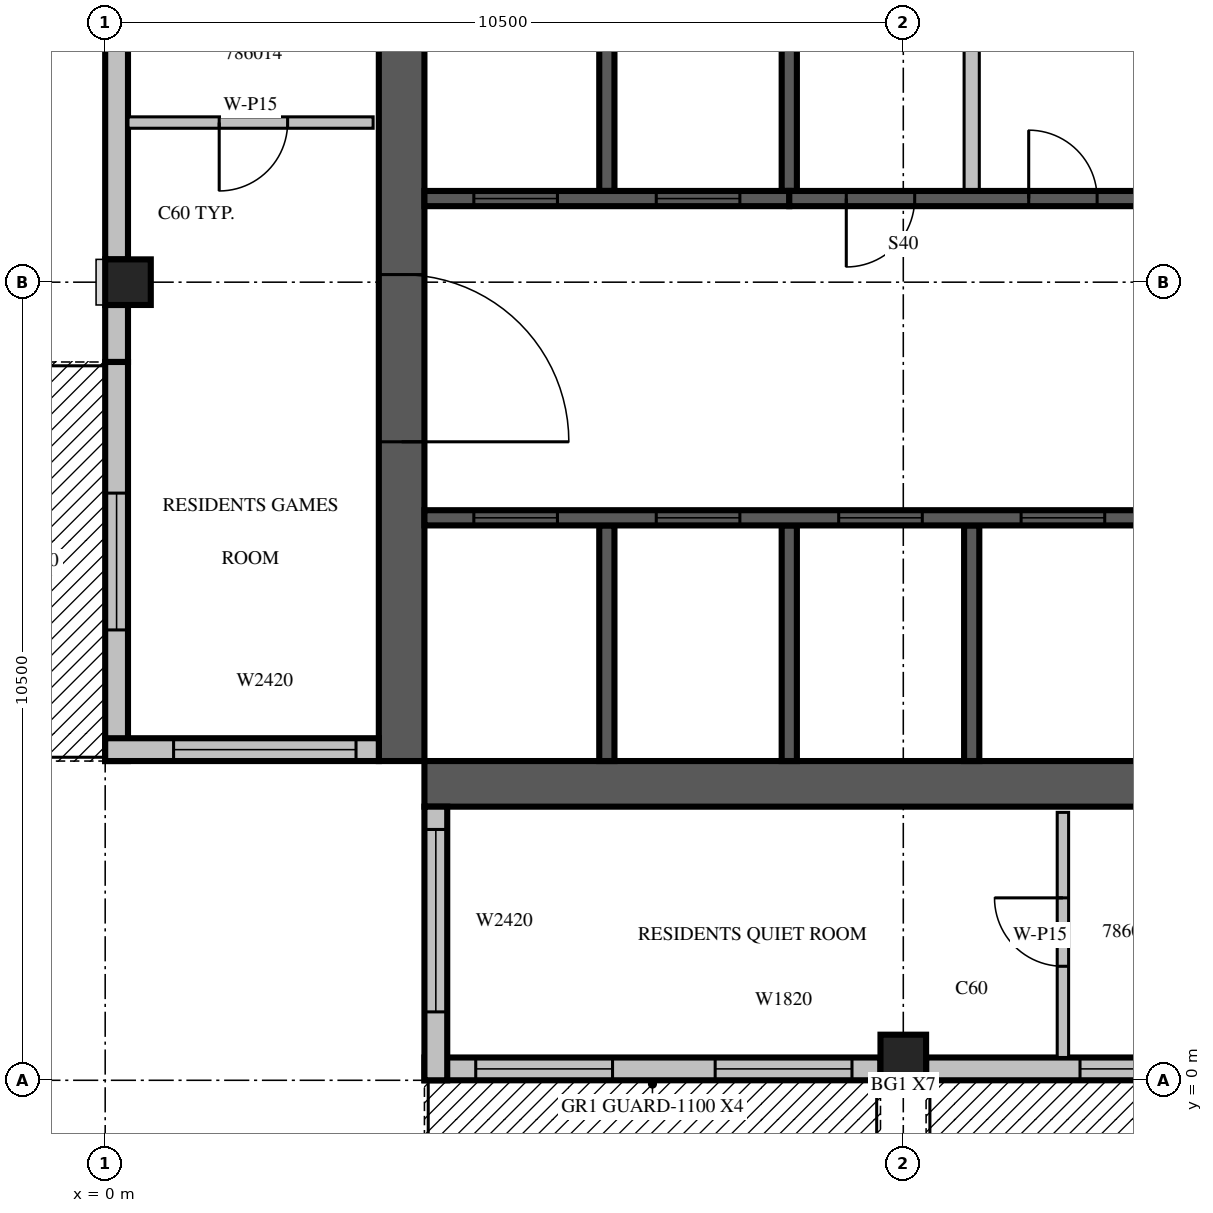
"""IFC4 building model, lengths in metres.
Left out: names, types, materials, properties, quantities, classifications, styles, units other than length and angle.
Written with IfcOpenShell. Run it as: python <this file> out.ifc"""

import sys

from ifc_helpers import new_model, si_unit, direction, frame, frame_2d, origin, origin_2d, place, context, subcontext, project, spatial, rectangle, extrude, source, transform, mapped, element, fill, save


model = new_model("IFC4")
c1 = context("Model", 3, precision=1e-05, world=origin(), true_north=direction((0.0, 1.0)))
c2 = subcontext(c1, "Body", "Model", "MODEL_VIEW")
j1 = project(units=[si_unit("LENGTHUNIT", "METRE"), si_unit("PLANEANGLEUNIT", "RADIAN")], contexts=[c1])
p1 = place(None, origin())
s1 = spatial("IfcSite", under=j1, at=p1, CompositionType="ELEMENT")
p2 = place(p1, origin())
s2 = spatial("IfcBuilding", under=s1, at=p2, CompositionType="ELEMENT")
p3 = place(p2, frame((0.0, 0.0, 361.5)))
s3 = spatial("IfcBuildingStorey", under=s2, at=p3, CompositionType="ELEMENT", Elevation=361.5)
m1 = source(origin(), c2, "Body", "SweptSolid", [
    extrude(rectangle(XDim=0.6, YDim=0.6, at=origin_2d()), origin(), (0.0, 0.0, 1.0), 3.5),
])
for number, where, z_axis, x_axis in (
    (1, (10.5, 0.3, 0.0), (0.0, 0.0, 1.0), (1.0, 0.0, 0.0)),
    (2, (0.3, 10.5, 0.0), (0.0, 0.0, 1.0), (1.0, 0.0, 0.0)),
):
    element("IfcColumn", number, at=place(p3, frame(where, z_axis=z_axis, x_axis=x_axis)), inside=s3, PredefinedType="COLUMN", context=c2, shape_type="MappedRepresentation", body=[
        mapped(m1, transform((0.0, 0.0, 0.0), scale=1.0)),
    ])
m2 = source(origin(), c2, "Body", "SweptSolid", [
    extrude(rectangle(XDim=17.4, YDim=0.6, at=frame_2d((8.7, 0.0))), origin(), (0.0, 0.0, 1.0), 3.5),
])
p4 = place(p3, frame((3.9, 4.2, 0.0), z_axis=(0.0, 0.0, 1.0), x_axis=(0.0, 1.0, 0.0)))
e3 = element("IfcWall", 3, at=p4, inside=s3, PredefinedType="SHEAR", context=c2, shape_type="MappedRepresentation", body=[
    mapped(m2, transform((0.0, 0.0, 0.0), scale=1.0)),
])
m3 = source(origin(), c2, "Body", "SweptSolid", [
    extrude(rectangle(XDim=2.2, YDim=2.1, at=frame_2d((1.1, 1.05))), frame((0.0, 0.31, 0.0), z_axis=(0.0, -1.0, 0.0), x_axis=(1.0, 0.0, 0.0)), (0.0, 0.0, 1.0), 0.62),
])
p5 = place(p4, frame((4.2, 0.0, 0.0)))
e4 = element("IfcOpeningElement", 4, at=p5, cuts=e3, PredefinedType="OPENING", context=c2, shape_type="MappedRepresentation", body=[
    mapped(m3, transform((0.0, 0.0, 0.0), scale=1.0)),
])
p6 = place(p3, frame((4.2, 3.9, 0.0), z_axis=(0.0, 0.0, 1.0), x_axis=(1.0, 0.0, 0.0)))
e5 = element("IfcWall", 5, at=p6, inside=s3, PredefinedType="SHEAR", context=c2, shape_type="MappedRepresentation", body=[
    mapped(m2, transform((0.0, 0.0, 0.0), scale=1.0)),
])
m4 = source(origin(), c2, "Body", "SweptSolid", [
    extrude(rectangle(XDim=0.9, YDim=2.1, at=frame_2d((0.45, 1.05))), frame((0.0, 0.31, 0.0), z_axis=(0.0, -1.0, 0.0), x_axis=(1.0, 0.0, 0.0)), (0.0, 0.0, 1.0), 0.62),
])
p7 = place(p6, frame((14.0, 0.0, 0.0)))
e6 = element("IfcOpeningElement", 6, at=p7, cuts=e5, PredefinedType="OPENING", context=c2, shape_type="MappedRepresentation", body=[
    mapped(m4, transform((0.0, 0.0, 0.0), scale=1.0)),
])
m5 = source(origin(), c2, "Body", "SweptSolid", [
    extrude(rectangle(XDim=6.0, YDim=0.3, at=frame_2d((3.0, 0.0))), origin(), (0.0, 0.0, 1.0), 3.1),
])
p8 = place(p3, frame((4.2, 0.15, 0.0), z_axis=(0.0, 0.0, 1.0), x_axis=(1.0, 0.0, 0.0)))
e7 = element("IfcWall", 7, at=p8, inside=s3, PredefinedType="STANDARD", context=c2, shape_type="MappedRepresentation", body=[
    mapped(m5, transform((0.0, 0.0, 0.0), scale=1.0)),
])
m6 = source(origin(), c2, "Body", "SweptSolid", [
    extrude(rectangle(XDim=1.8, YDim=2.4, at=frame_2d((0.9, 1.2))), frame((0.0, 0.16, 0.0), z_axis=(0.0, -1.0, 0.0), x_axis=(1.0, 0.0, 0.0)), (0.0, 0.0, 1.0), 0.32),
])
p9 = place(p8, frame((0.675, 0.0, 0.0)))
e8 = element("IfcOpeningElement", 8, at=p9, cuts=e7, PredefinedType="OPENING", context=c2, shape_type="MappedRepresentation", body=[
    mapped(m6, transform((0.0, 0.0, 0.0), scale=1.0)),
])
m7 = source(origin(), c2, "Body", "SweptSolid", [
    extrude(rectangle(XDim=1.8, YDim=2.0, at=frame_2d((0.9, 1.0))), frame((0.0, 0.16, 0.0), z_axis=(0.0, -1.0, 0.0), x_axis=(1.0, 0.0, 0.0)), (0.0, 0.0, 1.0), 0.32),
])
p10 = place(p8, frame((3.825, 0.0, 0.6)))
e9 = element("IfcOpeningElement", 9, at=p10, cuts=e7, PredefinedType="OPENING", context=c2, shape_type="MappedRepresentation", body=[
    mapped(m7, transform((0.0, 0.0, 0.0), scale=1.0)),
])
m8 = source(origin(), c2, "Body", "SweptSolid", [
    extrude(rectangle(XDim=9.9, YDim=0.3, at=frame_2d((4.95, 0.0))), origin(), (0.0, 0.0, 1.0), 3.1),
])
p11 = place(p3, frame((10.8, 0.15, 0.0), z_axis=(0.0, 0.0, 1.0), x_axis=(1.0, 0.0, 0.0)))
e10 = element("IfcWall", 10, at=p11, inside=s3, PredefinedType="STANDARD", context=c2, shape_type="MappedRepresentation", body=[
    mapped(m8, transform((0.0, 0.0, 0.0), scale=1.0)),
])
p12 = place(p11, frame((2.025, 0.0, 0.0)))
e11 = element("IfcOpeningElement", 11, at=p12, cuts=e10, PredefinedType="OPENING", context=c2, shape_type="MappedRepresentation", body=[
    mapped(m6, transform((0.0, 0.0, 0.0), scale=1.0)),
])
m9 = source(origin(), c2, "Body", "SweptSolid", [
    extrude(rectangle(XDim=3.6, YDim=2.0, at=frame_2d((1.8, 1.0))), frame((0.0, 0.16, 0.0), z_axis=(0.0, -1.0, 0.0), x_axis=(1.0, 0.0, 0.0)), (0.0, 0.0, 1.0), 0.32),
])
p13 = place(p11, frame((5.775, 0.0, 0.6)))
e12 = element("IfcOpeningElement", 12, at=p13, cuts=e10, PredefinedType="OPENING", context=c2, shape_type="MappedRepresentation", body=[
    mapped(m9, transform((0.0, 0.0, 0.0), scale=1.0)),
])
m10 = source(origin(), c2, "Body", "SweptSolid", [
    extrude(rectangle(XDim=3.9, YDim=0.3, at=frame_2d((1.95, 0.0))), origin(), (0.0, 0.0, 1.0), 3.1),
])
p14 = place(p3, frame((0.15, 14.7, 0.0), z_axis=(0.0, 0.0, 1.0), x_axis=(0.0, -1.0, 0.0)))
e13 = element("IfcWall", 13, at=p14, inside=s3, PredefinedType="STANDARD", context=c2, shape_type="MappedRepresentation", body=[
    mapped(m10, transform((0.0, 0.0, 0.0), scale=1.0)),
])
m11 = source(origin(), c2, "Body", "SweptSolid", [
    extrude(rectangle(XDim=0.75, YDim=0.3, at=frame_2d((0.375, 0.0))), origin(), (0.0, 0.0, 1.0), 3.1),
])
p15 = place(p3, frame((0.15, 10.2, 0.0), z_axis=(0.0, 0.0, 1.0), x_axis=(0.0, -1.0, 0.0)))
e14 = element("IfcWall", 14, at=p15, inside=s3, PredefinedType="STANDARD", context=c2, shape_type="MappedRepresentation", body=[
    mapped(m11, transform((0.0, 0.0, 0.0), scale=1.0)),
])
m12 = source(origin(), c2, "Body", "SweptSolid", [
    extrude(rectangle(XDim=5.25, YDim=0.3, at=frame_2d((2.625, 0.0))), origin(), (0.0, 0.0, 1.0), 3.1),
])
p16 = place(p3, frame((0.15, 9.45, 0.0), z_axis=(0.0, 0.0, 1.0), x_axis=(0.0, -1.0, 0.0)))
e15 = element("IfcWall", 15, at=p16, inside=s3, PredefinedType="STANDARD", context=c2, shape_type="MappedRepresentation", body=[
    mapped(m12, transform((0.0, 0.0, 0.0), scale=1.0)),
])
p17 = place(p16, frame((1.725, 0.0, 0.0)))
e16 = element("IfcOpeningElement", 16, at=p17, cuts=e15, PredefinedType="OPENING", context=c2, shape_type="MappedRepresentation", body=[
    mapped(m6, transform((0.0, 0.0, 0.0), scale=1.0)),
])
m13 = source(origin(), c2, "Body", "SweptSolid", [
    extrude(rectangle(XDim=3.6, YDim=0.3, at=frame_2d((1.8, 0.0))), origin(), (0.0, 0.0, 1.0), 3.1),
])
p18 = place(p3, frame((0.0, 4.35, 0.0), z_axis=(0.0, 0.0, 1.0), x_axis=(1.0, 0.0, 0.0)))
e17 = element("IfcWall", 17, at=p18, inside=s3, PredefinedType="STANDARD", context=c2, shape_type="MappedRepresentation", body=[
    mapped(m13, transform((0.0, 0.0, 0.0), scale=1.0)),
])
m14 = source(origin(), c2, "Body", "SweptSolid", [
    extrude(rectangle(XDim=2.4, YDim=2.0, at=frame_2d((1.2, 1.0))), frame((0.0, 0.16, 0.0), z_axis=(0.0, -1.0, 0.0), x_axis=(1.0, 0.0, 0.0)), (0.0, 0.0, 1.0), 0.32),
])
p19 = place(p18, frame((0.9, 0.0, 0.6)))
e18 = element("IfcOpeningElement", 18, at=p19, cuts=e17, PredefinedType="OPENING", context=c2, shape_type="MappedRepresentation", body=[
    mapped(m14, transform((0.0, 0.0, 0.0), scale=1.0)),
])
p20 = place(p3, frame((4.35, 3.6, 0.0), z_axis=(0.0, 0.0, 1.0), x_axis=(0.0, -1.0, 0.0)))
e19 = element("IfcWall", 19, at=p20, inside=s3, PredefinedType="STANDARD", context=c2, shape_type="MappedRepresentation", body=[
    mapped(m13, transform((0.0, 0.0, 0.0), scale=1.0)),
])
p21 = place(p20, frame((0.3, 0.0, 0.6)))
e20 = element("IfcOpeningElement", 20, at=p21, cuts=e19, PredefinedType="OPENING", context=c2, shape_type="MappedRepresentation", body=[
    mapped(m14, transform((0.0, 0.0, 0.0), scale=1.0)),
])
m15 = source(origin(), c2, "Body", "SweptSolid", [
    extrude(rectangle(XDim=3.1, YDim=0.2, at=frame_2d((1.55, 0.0))), origin(), (0.0, 0.0, 1.0), 3.5),
])
for number, where, z_axis, x_axis in (
    (21, (6.6, 4.2, 0.0), (0.0, 0.0, 1.0), (0.0, 1.0, 0.0)),
    (22, (9.0, 4.2, 0.0), (0.0, 0.0, 1.0), (0.0, 1.0, 0.0)),
    (23, (11.4, 4.2, 0.0), (0.0, 0.0, 1.0), (0.0, 1.0, 0.0)),
):
    element("IfcWall", number, at=place(p3, frame(where, z_axis=z_axis, x_axis=x_axis)), inside=s3, PredefinedType="SOLIDWALL", context=c2, shape_type="MappedRepresentation", body=[
        mapped(m15, transform((0.0, 0.0, 0.0), scale=1.0)),
    ])
m16 = source(origin(), c2, "Body", "SweptSolid", [
    extrude(rectangle(XDim=3.0, YDim=0.2, at=frame_2d((1.5, 0.0))), origin(), (0.0, 0.0, 1.0), 3.5),
])
p22 = place(p3, frame((6.6, 11.7, 0.0), z_axis=(0.0, 0.0, 1.0), x_axis=(0.0, 1.0, 0.0)))
e24 = element("IfcWall", 24, at=p22, inside=s3, PredefinedType="SOLIDWALL", context=c2, shape_type="MappedRepresentation", body=[
    mapped(m16, transform((0.0, 0.0, 0.0), scale=1.0)),
])
m17 = source(origin(), c2, "Body", "SweptSolid", [
    extrude(rectangle(XDim=3.0, YDim=0.2, at=frame_2d((1.5, 0.0))), origin(), (0.0, 0.0, 1.0), 3.1),
])
p23 = place(p3, frame((9.0, 11.7, 0.0), z_axis=(0.0, 0.0, 1.0), x_axis=(0.0, 1.0, 0.0)))
e25 = element("IfcWall", 25, at=p23, inside=s3, PredefinedType="SOLIDWALL", context=c2, shape_type="MappedRepresentation", body=[
    mapped(m17, transform((0.0, 0.0, 0.0), scale=1.0)),
])
m18 = source(origin(), c2, "Body", "SweptSolid", [
    extrude(rectangle(XDim=3.0, YDim=0.2, at=frame_2d((1.5, 0.0))), origin(), (0.0, 0.0, 1.0), 3.1),
])
p24 = place(p3, frame((11.4, 11.7, 0.0), z_axis=(0.0, 0.0, 1.0), x_axis=(0.0, 1.0, 0.0)))
e26 = element("IfcWall", 26, at=p24, inside=s3, PredefinedType="PARTITIONING", context=c2, shape_type="MappedRepresentation", body=[
    mapped(m18, transform((0.0, 0.0, 0.0), scale=1.0)),
])
m19 = source(origin(), c2, "Body", "SweptSolid", [
    extrude(rectangle(XDim=9.6, YDim=0.2, at=frame_2d((4.8, 0.0))), origin(), (0.0, 0.0, 1.0), 3.5),
])
p25 = place(p3, frame((4.2, 7.4, 0.0), z_axis=(0.0, 0.0, 1.0), x_axis=(1.0, 0.0, 0.0)))
e27 = element("IfcWall", 27, at=p25, inside=s3, PredefinedType="SOLIDWALL", context=c2, shape_type="MappedRepresentation", body=[
    mapped(m19, transform((0.0, 0.0, 0.0), scale=1.0)),
])
m20 = source(origin(), c2, "Body", "SweptSolid", [
    extrude(rectangle(XDim=1.1, YDim=2.1, at=frame_2d((0.55, 1.05))), frame((0.0, 0.11, 0.0), z_axis=(0.0, -1.0, 0.0), x_axis=(1.0, 0.0, 0.0)), (0.0, 0.0, 1.0), 0.22),
])
p26 = place(p25, frame((0.65, 0.0, 0.0)))
e28 = element("IfcOpeningElement", 28, at=p26, cuts=e27, PredefinedType="OPENING", context=c2, shape_type="MappedRepresentation", body=[
    mapped(m20, transform((0.0, 0.0, 0.0), scale=1.0)),
])
p27 = place(p25, frame((3.05, 0.0, 0.0)))
e29 = element("IfcOpeningElement", 29, at=p27, cuts=e27, PredefinedType="OPENING", context=c2, shape_type="MappedRepresentation", body=[
    mapped(m20, transform((0.0, 0.0, 0.0), scale=1.0)),
])
p28 = place(p25, frame((5.45, 0.0, 0.0)))
e30 = element("IfcOpeningElement", 30, at=p28, cuts=e27, PredefinedType="OPENING", context=c2, shape_type="MappedRepresentation", body=[
    mapped(m20, transform((0.0, 0.0, 0.0), scale=1.0)),
])
p29 = place(p25, frame((7.85, 0.0, 0.0)))
e31 = element("IfcOpeningElement", 31, at=p29, cuts=e27, PredefinedType="OPENING", context=c2, shape_type="MappedRepresentation", body=[
    mapped(m20, transform((0.0, 0.0, 0.0), scale=1.0)),
])
m21 = source(origin(), c2, "Body", "SweptSolid", [
    extrude(rectangle(XDim=4.8, YDim=0.2, at=frame_2d((2.4, 0.0))), origin(), (0.0, 0.0, 1.0), 3.5),
])
p30 = place(p3, frame((4.2, 11.6, 0.0), z_axis=(0.0, 0.0, 1.0), x_axis=(1.0, 0.0, 0.0)))
e32 = element("IfcWall", 32, at=p30, inside=s3, PredefinedType="SOLIDWALL", context=c2, shape_type="MappedRepresentation", body=[
    mapped(m21, transform((0.0, 0.0, 0.0), scale=1.0)),
])
p31 = place(p30, frame((0.65, 0.0, 0.0)))
e33 = element("IfcOpeningElement", 33, at=p31, cuts=e32, PredefinedType="OPENING", context=c2, shape_type="MappedRepresentation", body=[
    mapped(m20, transform((0.0, 0.0, 0.0), scale=1.0)),
])
p32 = place(p30, frame((3.05, 0.0, 0.0)))
e34 = element("IfcOpeningElement", 34, at=p32, cuts=e32, PredefinedType="OPENING", context=c2, shape_type="MappedRepresentation", body=[
    mapped(m20, transform((0.0, 0.0, 0.0), scale=1.0)),
])
m22 = source(origin(), c2, "Body", "SweptSolid", [
    extrude(rectangle(XDim=4.8, YDim=0.2, at=frame_2d((2.4, 0.0))), origin(), (0.0, 0.0, 1.0), 3.1),
])
p33 = place(p3, frame((9.0, 11.6, 0.0), z_axis=(0.0, 0.0, 1.0), x_axis=(1.0, 0.0, 0.0)))
e35 = element("IfcWall", 35, at=p33, inside=s3, PredefinedType="SOLIDWALL", context=c2, shape_type="MappedRepresentation", body=[
    mapped(m22, transform((0.0, 0.0, 0.0), scale=1.0)),
])
m23 = source(origin(), c2, "Body", "SweptSolid", [
    extrude(rectangle(XDim=0.9, YDim=2.1, at=frame_2d((0.45, 1.05))), frame((0.0, 0.11, 0.0), z_axis=(0.0, -1.0, 0.0), x_axis=(1.0, 0.0, 0.0)), (0.0, 0.0, 1.0), 0.22),
])
p34 = place(p33, frame((0.75, 0.0, 0.0)))
e36 = element("IfcOpeningElement", 36, at=p34, cuts=e35, PredefinedType="OPENING", context=c2, shape_type="MappedRepresentation", body=[
    mapped(m23, transform((0.0, 0.0, 0.0), scale=1.0)),
])
p35 = place(p33, frame((3.15, 0.0, 0.0)))
e37 = element("IfcOpeningElement", 37, at=p35, cuts=e35, PredefinedType="OPENING", context=c2, shape_type="MappedRepresentation", body=[
    mapped(m23, transform((0.0, 0.0, 0.0), scale=1.0)),
])
m24 = source(origin(), c2, "Body", "SweptSolid", [
    extrude(rectangle(XDim=3.225, YDim=0.15, at=frame_2d((1.613, 0.0))), origin(), (0.0, 0.0, 1.0), 3.1),
])
p36 = place(p3, frame((12.6, 3.525, 0.0), z_axis=(0.0, 0.0, 1.0), x_axis=(0.0, -1.0, 0.0)))
e38 = element("IfcWall", 38, at=p36, inside=s3, PredefinedType="PARTITIONING", context=c2, shape_type="MappedRepresentation", body=[
    mapped(m24, transform((0.0, 0.0, 0.0), scale=1.0)),
])
m25 = source(origin(), c2, "Body", "SweptSolid", [
    extrude(rectangle(XDim=0.9, YDim=2.1, at=frame_2d((0.45, 1.05))), frame((0.0, 0.085, 0.0), z_axis=(0.0, -1.0, 0.0), x_axis=(1.0, 0.0, 0.0)), (0.0, 0.0, 1.0), 0.17),
])
p37 = place(p36, frame((1.125, 0.0, 0.0)))
e39 = element("IfcOpeningElement", 39, at=p37, cuts=e38, PredefinedType="OPENING", context=c2, shape_type="MappedRepresentation", body=[
    mapped(m25, transform((0.0, 0.0, 0.0), scale=1.0)),
])
p38 = place(p3, frame((0.3, 12.6, 0.0), z_axis=(0.0, 0.0, 1.0), x_axis=(1.0, 0.0, 0.0)))
e40 = element("IfcWall", 40, at=p38, inside=s3, PredefinedType="PARTITIONING", context=c2, shape_type="MappedRepresentation", body=[
    mapped(m24, transform((0.0, 0.0, 0.0), scale=1.0)),
])
p39 = place(p38, frame((1.2, 0.0, 0.0)))
e41 = element("IfcOpeningElement", 41, at=p39, cuts=e40, PredefinedType="OPENING", context=c2, shape_type="MappedRepresentation", body=[
    mapped(m25, transform((0.0, 0.0, 0.0), scale=1.0)),
])
m26 = source(origin(), c2, "Body", "SweptSolid", [
    extrude(rectangle(XDim=1.8, YDim=2.4, at=frame_2d((0.9, 1.2))), frame((0.0, 0.025, 0.0), z_axis=(0.0, -1.0, 0.0), x_axis=(1.0, 0.0, 0.0)), (0.0, 0.0, 1.0), 0.05),
])
p40 = place(p9, origin())
e42 = element("IfcDoor", 42, at=p40, inside=s3, OperationType="SLIDING_TO_LEFT", PredefinedType="DOOR", context=c2, shape_type="MappedRepresentation", body=[
    mapped(m26, transform((0.0, 0.0, 0.0), scale=1.0)),
])
fill(e8, e42)
m27 = source(origin(), c2, "Body", "SweptSolid", [
    extrude(rectangle(XDim=1.8, YDim=2.0, at=frame_2d((0.9, 1.0))), frame((0.0, 0.03, 0.0), z_axis=(0.0, -1.0, 0.0), x_axis=(1.0, 0.0, 0.0)), (0.0, 0.0, 1.0), 0.06),
])
p41 = place(p10, origin())
e43 = element("IfcWindow", 43, at=p41, inside=s3, PartitioningType="SINGLE_PANEL", PredefinedType="WINDOW", context=c2, shape_type="MappedRepresentation", body=[
    mapped(m27, transform((0.0, 0.0, 0.0), scale=1.0)),
])
fill(e9, e43)
p42 = place(p12, origin())
e44 = element("IfcDoor", 44, at=p42, inside=s3, OperationType="SLIDING_TO_LEFT", PredefinedType="DOOR", context=c2, shape_type="MappedRepresentation", body=[
    mapped(m26, transform((0.0, 0.0, 0.0), scale=1.0)),
])
fill(e11, e44)
p43 = place(p17, origin())
e45 = element("IfcDoor", 45, at=p43, inside=s3, OperationType="SLIDING_TO_LEFT", PredefinedType="DOOR", context=c2, shape_type="MappedRepresentation", body=[
    mapped(m26, transform((0.0, 0.0, 0.0), scale=1.0)),
])
fill(e16, e45)
m28 = source(origin(), c2, "Body", "SweptSolid", [
    extrude(rectangle(XDim=2.4, YDim=2.0, at=frame_2d((1.2, 1.0))), frame((0.0, 0.03, 0.0), z_axis=(0.0, -1.0, 0.0), x_axis=(1.0, 0.0, 0.0)), (0.0, 0.0, 1.0), 0.06),
])
p44 = place(p19, origin())
e46 = element("IfcWindow", 46, at=p44, inside=s3, PartitioningType="SINGLE_PANEL", PredefinedType="WINDOW", context=c2, shape_type="MappedRepresentation", body=[
    mapped(m28, transform((0.0, 0.0, 0.0), scale=1.0)),
])
fill(e18, e46)
p45 = place(p21, origin())
e47 = element("IfcWindow", 47, at=p45, inside=s3, PartitioningType="SINGLE_PANEL", PredefinedType="WINDOW", context=c2, shape_type="MappedRepresentation", body=[
    mapped(m28, transform((0.0, 0.0, 0.0), scale=1.0)),
])
fill(e20, e47)
m29 = source(origin(), c2, "Body", "SweptSolid", [
    extrude(rectangle(XDim=1.1, YDim=2.1, at=frame_2d((0.55, 1.05))), frame((0.0, 0.025, 0.0), z_axis=(0.0, -1.0, 0.0), x_axis=(1.0, 0.0, 0.0)), (0.0, 0.0, 1.0), 0.05),
])
p46 = place(p26, origin())
e48 = element("IfcDoor", 48, at=p46, inside=s3, OperationType="SLIDING_TO_LEFT", PredefinedType="DOOR", context=c2, shape_type="MappedRepresentation", body=[
    mapped(m29, transform((0.0, 0.0, 0.0), scale=1.0)),
])
fill(e28, e48)
p47 = place(p27, origin())
e49 = element("IfcDoor", 49, at=p47, inside=s3, OperationType="SLIDING_TO_LEFT", PredefinedType="DOOR", context=c2, shape_type="MappedRepresentation", body=[
    mapped(m29, transform((0.0, 0.0, 0.0), scale=1.0)),
])
fill(e29, e49)
p48 = place(p28, origin())
e50 = element("IfcDoor", 50, at=p48, inside=s3, OperationType="SLIDING_TO_LEFT", PredefinedType="DOOR", context=c2, shape_type="MappedRepresentation", body=[
    mapped(m29, transform((0.0, 0.0, 0.0), scale=1.0)),
])
fill(e30, e50)
p49 = place(p29, origin())
e51 = element("IfcDoor", 51, at=p49, inside=s3, OperationType="SLIDING_TO_LEFT", PredefinedType="DOOR", context=c2, shape_type="MappedRepresentation", body=[
    mapped(m29, transform((0.0, 0.0, 0.0), scale=1.0)),
])
fill(e31, e51)
p50 = place(p31, origin())
e52 = element("IfcDoor", 52, at=p50, inside=s3, OperationType="SLIDING_TO_LEFT", PredefinedType="DOOR", context=c2, shape_type="MappedRepresentation", body=[
    mapped(m29, transform((0.0, 0.0, 0.0), scale=1.0)),
])
fill(e33, e52)
p51 = place(p32, origin())
e53 = element("IfcDoor", 53, at=p51, inside=s3, OperationType="SLIDING_TO_LEFT", PredefinedType="DOOR", context=c2, shape_type="MappedRepresentation", body=[
    mapped(m29, transform((0.0, 0.0, 0.0), scale=1.0)),
])
fill(e34, e53)
m30 = source(origin(), c2, "Body", "SweptSolid", [
    extrude(rectangle(XDim=0.9, YDim=2.1, at=frame_2d((0.45, 1.05))), frame((0.0, 0.025, 0.0), z_axis=(0.0, -1.0, 0.0), x_axis=(1.0, 0.0, 0.0)), (0.0, 0.0, 1.0), 0.05),
])
p52 = place(p34, origin())
e54 = element("IfcDoor", 54, at=p52, inside=s3, OperationType="SINGLE_SWING_RIGHT", PredefinedType="DOOR", context=c2, shape_type="MappedRepresentation", body=[
    mapped(m30, transform((0.0, 0.0, 0.0), scale=1.0)),
])
fill(e36, e54)
p53 = place(p35, origin())
e55 = element("IfcDoor", 55, at=p53, inside=s3, OperationType="SINGLE_SWING_LEFT", PredefinedType="DOOR", context=c2, shape_type="MappedRepresentation", body=[
    mapped(m30, transform((0.0, 0.0, 0.0), scale=1.0)),
])
fill(e37, e55)
m31 = source(origin(), c2, "Body", "SweptSolid", [
    extrude(rectangle(XDim=2.2, YDim=2.1, at=frame_2d((1.1, 1.05))), frame((0.0, 0.025, 0.0), z_axis=(0.0, -1.0, 0.0), x_axis=(1.0, 0.0, 0.0)), (0.0, 0.0, 1.0), 0.05),
])
p54 = place(p5, origin())
e56 = element("IfcDoor", 56, at=p54, inside=s3, OperationType="DOUBLE_DOOR_SINGLE_SWING", PredefinedType="DOOR", context=c2, shape_type="MappedRepresentation", body=[
    mapped(m31, transform((0.0, 0.0, 0.0), scale=1.0)),
])
fill(e4, e56)
p55 = place(p37, origin())
e57 = element("IfcDoor", 57, at=p55, inside=s3, OperationType="SINGLE_SWING_RIGHT", PredefinedType="DOOR", context=c2, shape_type="MappedRepresentation", body=[
    mapped(m30, transform((0.0, 0.0, 0.0), scale=1.0)),
])
fill(e39, e57)
p56 = place(p39, origin())
e58 = element("IfcDoor", 58, at=p56, inside=s3, OperationType="SINGLE_SWING_RIGHT", PredefinedType="DOOR", context=c2, shape_type="MappedRepresentation", body=[
    mapped(m30, transform((0.0, 0.0, 0.0), scale=1.0)),
])
fill(e41, e58)
save(model, sys.argv[1])
